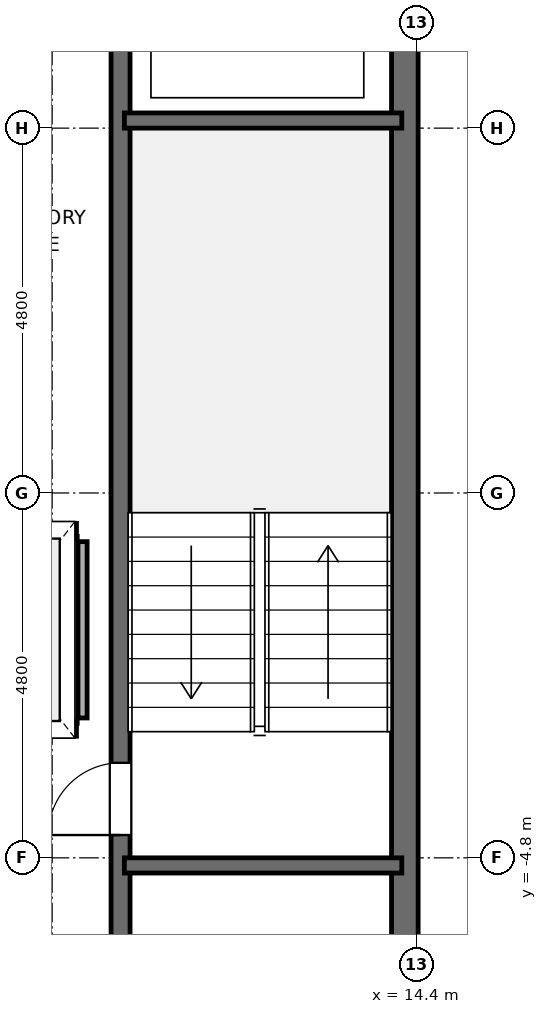
"""IFC4 building model, lengths in metres.
Left out: names, types, materials, properties, quantities, classifications, styles, units other than length and angle.
Written with IfcOpenShell. Run it as: python <this file> out.ifc"""

import sys

from ifc_helpers import new_model, si_unit, direction, frame, frame_2d, origin, place, context, subcontext, project, spatial, rectangle, extrude, element, fill, save


model = new_model("IFC4")
c1 = context("Model", 3, precision=1e-05, world=origin(), true_north=direction((0.0, 1.0)))
c2 = subcontext(c1, "Body", "Model", "MODEL_VIEW")
j1 = project(units=[si_unit("LENGTHUNIT", "METRE"), si_unit("PLANEANGLEUNIT", "RADIAN")], contexts=[c1])
p1 = place(None, origin())
s1 = spatial("IfcSite", under=j1, at=p1, CompositionType="ELEMENT")
p2 = place(p1, origin())
s2 = spatial("IfcBuilding", under=s1, at=p2, CompositionType="ELEMENT")
p3 = place(p2, frame((0.0, 0.0, 124.8)))
s3 = spatial("IfcBuildingStorey", under=s2, at=p3, CompositionType="ELEMENT", Elevation=124.8)
p4 = place(p3, frame((14.24, -7.2, -0.18), z_axis=(0.0, 0.0, 1.0), x_axis=(0.0, 1.0, 0.0)))
e1 = element("IfcWall", 1, at=p4, inside=s3, PredefinedType="SHEAR", context=c2, shape_type="SweptSolid", body=[
    extrude(rectangle(XDim=14.4, YDim=0.35, at=frame_2d((7.2, 0.0))), origin(), (0.0, 0.0, 1.0), 3.7),
])
p5 = place(p3, frame((10.5, -6.82, -0.18), z_axis=(0.0, 0.0, 1.0), x_axis=(0.0, 1.0, 0.0)))
e2 = element("IfcWall", 2, at=p5, inside=s3, PredefinedType="SOLIDWALL", context=c2, shape_type="SweptSolid", body=[
    extrude(rectangle(XDim=13.64, YDim=0.25, at=frame_2d((6.82, 0.0))), origin(), (0.0, 0.0, 1.0), 3.7),
])
p6 = place(p5, frame((2.32, 0.0, 0.18)))
e3 = element("IfcOpeningElement", 3, at=p6, cuts=e2, PredefinedType="OPENING", context=c2, shape_type="SweptSolid", body=[
    extrude(rectangle(XDim=0.95, YDim=2.15, at=frame_2d((0.475, 1.075))), frame((0.0, 0.14, 0.0), z_axis=(0.0, -1.0, 0.0), x_axis=(1.0, 0.0, 0.0)), (0.0, 0.0, 1.0), 0.28),
])
for number, where, z_axis, x_axis in (
    (4, (10.55, -4.9, -0.18), (0.0, 0.0, 1.0), (1.0, 0.0, 0.0)),
    (5, (10.55, 4.9, -0.18), (0.0, 0.0, 1.0), (1.0, 0.0, 0.0)),
):
    element("IfcWall", number, at=place(p3, frame(where, z_axis=z_axis, x_axis=x_axis)), inside=s3, PredefinedType="SOLIDWALL", context=c2, shape_type="SweptSolid", body=[
        extrude(rectangle(XDim=3.65, YDim=0.2, at=frame_2d((1.825, 0.0))), origin(), (0.0, 0.0, 1.0), 3.7),
    ])
p7 = place(p3, frame((7.88, -3.1, 0.0), z_axis=(0.0, 0.0, 1.0), x_axis=(1.0, 0.0, 0.0)))
e6 = element("IfcWall", 6, at=p7, inside=s3, PredefinedType="SOLIDWALL", context=c2, shape_type="SweptSolid", body=[
    extrude(rectangle(XDim=2.04, YDim=0.2, at=frame_2d((1.02, 0.0))), origin(), (0.0, 0.0, 1.0), 3.52),
])
p8 = place(p7, frame((0.47, 0.0, 0.0)))
e7 = element("IfcOpeningElement", 7, at=p8, cuts=e6, PredefinedType="OPENING", context=c2, shape_type="SweptSolid", body=[
    extrude(rectangle(XDim=1.1, YDim=2.2, at=frame_2d((0.55, 1.1))), frame((0.0, 0.115, 0.0), z_axis=(0.0, -1.0, 0.0), x_axis=(1.0, 0.0, 0.0)), (0.0, 0.0, 1.0), 0.23),
])
p9 = place(p3, frame((7.88, -0.5, 0.0), z_axis=(0.0, 0.0, 1.0), x_axis=(1.0, 0.0, 0.0)))
e8 = element("IfcWall", 8, at=p9, inside=s3, PredefinedType="SOLIDWALL", context=c2, shape_type="SweptSolid", body=[
    extrude(rectangle(XDim=2.04, YDim=0.2, at=frame_2d((1.02, 0.0))), origin(), (0.0, 0.0, 1.0), 3.52),
])
p10 = place(p3, frame((10.0, -2.96, 0.0), z_axis=(0.0, 0.0, 1.0), x_axis=(0.0, 1.0, 0.0)))
e9 = element("IfcWall", 9, at=p10, inside=s3, PredefinedType="PARTITIONING", context=c2, shape_type="SweptSolid", body=[
    extrude(rectangle(XDim=2.32, YDim=0.12, at=frame_2d((1.16, 0.0))), origin(), (0.0, 0.0, 1.0), 3.52),
])
p11 = place(p6, origin())
e10 = element("IfcDoor", 10, at=p11, inside=s3, OperationType="SINGLE_SWING_RIGHT", PredefinedType="DOOR", context=c2, shape_type="SweptSolid", body=[
    extrude(rectangle(XDim=0.95, YDim=2.15, at=frame_2d((0.475, 1.075))), frame((0.0, 0.025, 0.0), z_axis=(0.0, -1.0, 0.0), x_axis=(1.0, 0.0, 0.0)), (0.0, 0.0, 1.0), 0.05),
])
fill(e3, e10)
save(model, sys.argv[1])
